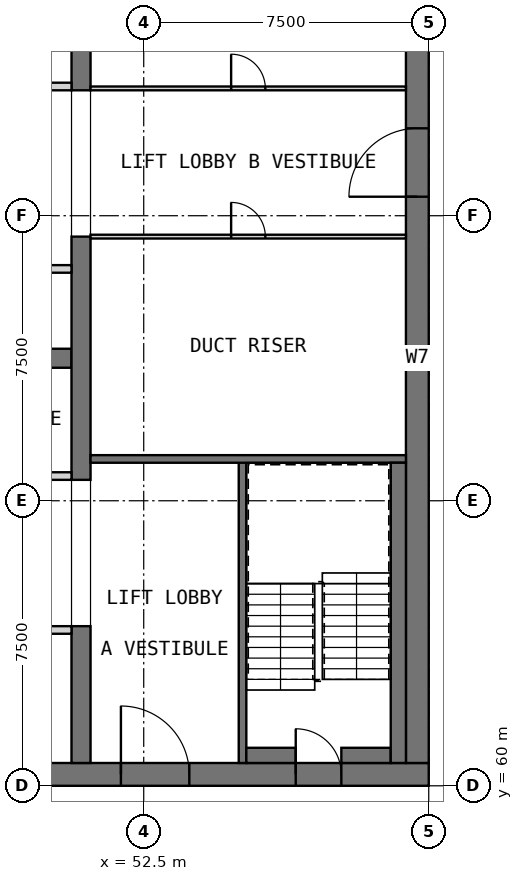
"""IFC4 building model, lengths in metres.
Left out: names, types, materials, properties, quantities, classifications, styles, units other than length and angle.
Written with IfcOpenShell. Run it as: python <this file> out.ifc"""

import sys

from ifc_helpers import new_model, si_unit, direction, frame, frame_2d, origin, place, context, subcontext, project, spatial, rectangle, extrude, element, fill, save


model = new_model("IFC4")
c1 = context("Model", 3, precision=1e-05, world=origin(), true_north=direction((0.0, 1.0)))
c2 = subcontext(c1, "Body", "Model", "MODEL_VIEW")
j1 = project(units=[si_unit("LENGTHUNIT", "METRE"), si_unit("PLANEANGLEUNIT", "RADIAN")], contexts=[c1])
p1 = place(None, origin())
s1 = spatial("IfcSite", under=j1, at=p1, CompositionType="ELEMENT")
p2 = place(p1, origin())
s2 = spatial("IfcBuilding", under=s1, at=p2, CompositionType="ELEMENT")
p3 = place(p2, frame((0.0, 0.0, 266.2)))
s3 = spatial("IfcBuildingStorey", under=s2, at=p3, CompositionType="ELEMENT", Elevation=266.2)
p4 = place(p3, frame((30.0, 60.3, 0.0), z_axis=(0.0, 0.0, 1.0), x_axis=(1.0, 0.0, 0.0)))
e1 = element("IfcWall", 1, at=p4, inside=s3, PredefinedType="SHEAR", context=c2, shape_type="SweptSolid", body=[
    extrude(rectangle(XDim=30.0, YDim=0.6, at=frame_2d((15.0, 0.0))), origin(), (0.0, 0.0, 1.0), 3.5),
])
p5 = place(p4, frame((21.9, 0.0, 0.0)))
e2 = element("IfcOpeningElement", 2, at=p5, cuts=e1, PredefinedType="OPENING", context=c2, shape_type="SweptSolid", body=[
    extrude(rectangle(XDim=1.8, YDim=2.1, at=frame_2d((0.9, 1.05))), frame((0.0, 0.31, 0.0), z_axis=(0.0, -1.0, 0.0), x_axis=(1.0, 0.0, 0.0)), (0.0, 0.0, 1.0), 0.62),
])
p6 = place(p4, frame((26.5, 0.0, 0.0)))
e3 = element("IfcOpeningElement", 3, at=p6, cuts=e1, PredefinedType="OPENING", context=c2, shape_type="SweptSolid", body=[
    extrude(rectangle(XDim=1.2, YDim=2.1, at=frame_2d((0.6, 1.05))), frame((0.0, 0.31, 0.0), z_axis=(0.0, -1.0, 0.0), x_axis=(1.0, 0.0, 0.0)), (0.0, 0.0, 1.0), 0.62),
])
p7 = place(p3, frame((59.7, 60.6, 0.0), z_axis=(0.0, 0.0, 1.0), x_axis=(0.0, 1.0, 0.0)))
e4 = element("IfcWall", 4, at=p7, inside=s3, PredefinedType="SHEAR", context=c2, shape_type="SweptSolid", body=[
    extrude(rectangle(XDim=21.3, YDim=0.6, at=frame_2d((10.65, 0.0))), origin(), (0.0, 0.0, 1.0), 3.5),
])
p8 = place(p7, frame((14.9, 0.0, 0.0)))
e5 = element("IfcOpeningElement", 5, at=p8, cuts=e4, PredefinedType="OPENING", context=c2, shape_type="SweptSolid", body=[
    extrude(rectangle(XDim=1.8, YDim=2.1, at=frame_2d((0.9, 1.05))), frame((0.0, 0.31, 0.0), z_axis=(0.0, -1.0, 0.0), x_axis=(1.0, 0.0, 0.0)), (0.0, 0.0, 1.0), 0.62),
])
p9 = place(p3, frame((35.0, 71.25, 0.0), z_axis=(0.0, 0.0, 1.0), x_axis=(1.0, 0.0, 0.0)))
e6 = element("IfcWall", 6, at=p9, inside=s3, PredefinedType="SHEAR", context=c2, shape_type="SweptSolid", body=[
    extrude(rectangle(XDim=15.6, YDim=0.5, at=frame_2d((7.8, 0.0))), origin(), (0.0, 0.0, 1.0), 3.5),
])
p10 = place(p3, frame((50.85, 60.6, 0.0), z_axis=(0.0, 0.0, 1.0), x_axis=(0.0, 1.0, 0.0)))
e7 = element("IfcWall", 7, at=p10, inside=s3, PredefinedType="SHEAR", context=c2, shape_type="SweptSolid", body=[
    extrude(rectangle(XDim=3.6, YDim=0.5, at=frame_2d((1.8, 0.0))), origin(), (0.0, 0.0, 1.0), 3.5),
])
p11 = place(p3, frame((50.85, 68.05, 0.0), z_axis=(0.0, 0.0, 1.0), x_axis=(0.0, 1.0, 0.0)))
e8 = element("IfcWall", 8, at=p11, inside=s3, PredefinedType="SHEAR", context=c2, shape_type="SweptSolid", body=[
    extrude(rectangle(XDim=6.4, YDim=0.5, at=frame_2d((3.2, 0.0))), origin(), (0.0, 0.0, 1.0), 3.5),
])
p12 = place(p3, frame((50.85, 78.3, 0.0), z_axis=(0.0, 0.0, 1.0), x_axis=(0.0, 1.0, 0.0)))
e9 = element("IfcWall", 9, at=p12, inside=s3, PredefinedType="SHEAR", context=c2, shape_type="SweptSolid", body=[
    extrude(rectangle(XDim=3.6, YDim=0.5, at=frame_2d((1.8, 0.0))), origin(), (0.0, 0.0, 1.0), 3.5),
])
p13 = place(p3, frame((35.0, 64.1, 0.0), z_axis=(0.0, 0.0, 1.0), x_axis=(1.0, 0.0, 0.0)))
e10 = element("IfcWall", 10, at=p13, inside=s3, PredefinedType="PARTITIONING", context=c2, shape_type="SweptSolid", body=[
    extrude(rectangle(XDim=15.6, YDim=0.2, at=frame_2d((7.8, 0.0))), origin(), (0.0, 0.0, 1.0), 3.25),
])
p14 = place(p13, frame((2.15, 0.0, 0.0)))
e11 = element("IfcOpeningElement", 11, at=p14, cuts=e10, PredefinedType="OPENING", context=c2, shape_type="SweptSolid", body=[
    extrude(rectangle(XDim=0.9, YDim=2.1, at=frame_2d((0.45, 1.05))), frame((0.0, 0.11, 0.0), z_axis=(0.0, -1.0, 0.0), x_axis=(1.0, 0.0, 0.0)), (0.0, 0.0, 1.0), 0.22),
])
p15 = place(p13, frame((9.95, 0.0, 0.0)))
e12 = element("IfcOpeningElement", 12, at=p15, cuts=e10, PredefinedType="OPENING", context=c2, shape_type="SweptSolid", body=[
    extrude(rectangle(XDim=0.9, YDim=2.1, at=frame_2d((0.45, 1.05))), frame((0.0, 0.11, 0.0), z_axis=(0.0, -1.0, 0.0), x_axis=(1.0, 0.0, 0.0)), (0.0, 0.0, 1.0), 0.22),
])
p16 = place(p3, frame((35.0, 68.15, 0.0), z_axis=(0.0, 0.0, 1.0), x_axis=(1.0, 0.0, 0.0)))
e13 = element("IfcWall", 13, at=p16, inside=s3, PredefinedType="PARTITIONING", context=c2, shape_type="SweptSolid", body=[
    extrude(rectangle(XDim=15.6, YDim=0.2, at=frame_2d((7.8, 0.0))), origin(), (0.0, 0.0, 1.0), 3.25),
])
p17 = place(p16, frame((1.5, 0.0, 0.0)))
e14 = element("IfcOpeningElement", 14, at=p17, cuts=e13, PredefinedType="OPENING", context=c2, shape_type="SweptSolid", body=[
    extrude(rectangle(XDim=0.9, YDim=2.1, at=frame_2d((0.45, 1.05))), frame((0.0, 0.11, 0.0), z_axis=(0.0, -1.0, 0.0), x_axis=(1.0, 0.0, 0.0)), (0.0, 0.0, 1.0), 0.22),
])
p18 = place(p16, frame((7.35, 0.0, 0.0)))
e15 = element("IfcOpeningElement", 15, at=p18, cuts=e13, PredefinedType="OPENING", context=c2, shape_type="SweptSolid", body=[
    extrude(rectangle(XDim=0.9, YDim=2.1, at=frame_2d((0.45, 1.05))), frame((0.0, 0.11, 0.0), z_axis=(0.0, -1.0, 0.0), x_axis=(1.0, 0.0, 0.0)), (0.0, 0.0, 1.0), 0.22),
])
p19 = place(p16, frame((13.2, 0.0, 0.0)))
e16 = element("IfcOpeningElement", 16, at=p19, cuts=e13, PredefinedType="OPENING", context=c2, shape_type="SweptSolid", body=[
    extrude(rectangle(XDim=0.9, YDim=2.1, at=frame_2d((0.45, 1.05))), frame((0.0, 0.11, 0.0), z_axis=(0.0, -1.0, 0.0), x_axis=(1.0, 0.0, 0.0)), (0.0, 0.0, 1.0), 0.22),
])
p20 = place(p3, frame((35.0, 73.6, 0.0), z_axis=(0.0, 0.0, 1.0), x_axis=(1.0, 0.0, 0.0)))
e17 = element("IfcWall", 17, at=p20, inside=s3, PredefinedType="SOLIDWALL", context=c2, shape_type="SweptSolid", body=[
    extrude(rectangle(XDim=15.6, YDim=0.2, at=frame_2d((7.8, 0.0))), origin(), (0.0, 0.0, 1.0), 3.5),
])
p21 = place(p20, frame((0.75, 0.0, 0.0)))
e18 = element("IfcOpeningElement", 18, at=p21, cuts=e17, PredefinedType="OPENING", context=c2, shape_type="SweptSolid", body=[
    extrude(rectangle(XDim=1.1, YDim=2.1, at=frame_2d((0.55, 1.05))), frame((0.0, 0.11, 0.0), z_axis=(0.0, -1.0, 0.0), x_axis=(1.0, 0.0, 0.0)), (0.0, 0.0, 1.0), 0.22),
])
p22 = place(p20, frame((3.35, 0.0, 0.0)))
e19 = element("IfcOpeningElement", 19, at=p22, cuts=e17, PredefinedType="OPENING", context=c2, shape_type="SweptSolid", body=[
    extrude(rectangle(XDim=1.1, YDim=2.1, at=frame_2d((0.55, 1.05))), frame((0.0, 0.11, 0.0), z_axis=(0.0, -1.0, 0.0), x_axis=(1.0, 0.0, 0.0)), (0.0, 0.0, 1.0), 0.22),
])
p23 = place(p20, frame((5.95, 0.0, 0.0)))
e20 = element("IfcOpeningElement", 20, at=p23, cuts=e17, PredefinedType="OPENING", context=c2, shape_type="SweptSolid", body=[
    extrude(rectangle(XDim=1.1, YDim=2.1, at=frame_2d((0.55, 1.05))), frame((0.0, 0.11, 0.0), z_axis=(0.0, -1.0, 0.0), x_axis=(1.0, 0.0, 0.0)), (0.0, 0.0, 1.0), 0.22),
])
p24 = place(p20, frame((8.55, 0.0, 0.0)))
e21 = element("IfcOpeningElement", 21, at=p24, cuts=e17, PredefinedType="OPENING", context=c2, shape_type="SweptSolid", body=[
    extrude(rectangle(XDim=1.1, YDim=2.1, at=frame_2d((0.55, 1.05))), frame((0.0, 0.11, 0.0), z_axis=(0.0, -1.0, 0.0), x_axis=(1.0, 0.0, 0.0)), (0.0, 0.0, 1.0), 0.22),
])
p25 = place(p20, frame((11.15, 0.0, 0.0)))
e22 = element("IfcOpeningElement", 22, at=p25, cuts=e17, PredefinedType="OPENING", context=c2, shape_type="SweptSolid", body=[
    extrude(rectangle(XDim=1.1, YDim=2.1, at=frame_2d((0.55, 1.05))), frame((0.0, 0.11, 0.0), z_axis=(0.0, -1.0, 0.0), x_axis=(1.0, 0.0, 0.0)), (0.0, 0.0, 1.0), 0.22),
])
p26 = place(p20, frame((13.75, 0.0, 0.0)))
e23 = element("IfcOpeningElement", 23, at=p26, cuts=e17, PredefinedType="OPENING", context=c2, shape_type="SweptSolid", body=[
    extrude(rectangle(XDim=1.1, YDim=2.1, at=frame_2d((0.55, 1.05))), frame((0.0, 0.11, 0.0), z_axis=(0.0, -1.0, 0.0), x_axis=(1.0, 0.0, 0.0)), (0.0, 0.0, 1.0), 0.22),
])
p27 = place(p3, frame((35.0, 78.4, 0.0), z_axis=(0.0, 0.0, 1.0), x_axis=(1.0, 0.0, 0.0)))
e24 = element("IfcWall", 24, at=p27, inside=s3, PredefinedType="SOLIDWALL", context=c2, shape_type="SweptSolid", body=[
    extrude(rectangle(XDim=15.6, YDim=0.2, at=frame_2d((7.8, 0.0))), origin(), (0.0, 0.0, 1.0), 3.5),
])
p28 = place(p27, frame((0.75, 0.0, 0.0)))
e25 = element("IfcOpeningElement", 25, at=p28, cuts=e24, PredefinedType="OPENING", context=c2, shape_type="SweptSolid", body=[
    extrude(rectangle(XDim=1.1, YDim=2.1, at=frame_2d((0.55, 1.05))), frame((0.0, 0.11, 0.0), z_axis=(0.0, -1.0, 0.0), x_axis=(1.0, 0.0, 0.0)), (0.0, 0.0, 1.0), 0.22),
])
p29 = place(p27, frame((3.35, 0.0, 0.0)))
e26 = element("IfcOpeningElement", 26, at=p29, cuts=e24, PredefinedType="OPENING", context=c2, shape_type="SweptSolid", body=[
    extrude(rectangle(XDim=1.1, YDim=2.1, at=frame_2d((0.55, 1.05))), frame((0.0, 0.11, 0.0), z_axis=(0.0, -1.0, 0.0), x_axis=(1.0, 0.0, 0.0)), (0.0, 0.0, 1.0), 0.22),
])
p30 = place(p27, frame((11.15, 0.0, 0.0)))
e27 = element("IfcOpeningElement", 27, at=p30, cuts=e24, PredefinedType="OPENING", context=c2, shape_type="SweptSolid", body=[
    extrude(rectangle(XDim=1.1, YDim=2.1, at=frame_2d((0.55, 1.05))), frame((0.0, 0.11, 0.0), z_axis=(0.0, -1.0, 0.0), x_axis=(1.0, 0.0, 0.0)), (0.0, 0.0, 1.0), 0.22),
])
p31 = place(p27, frame((13.75, 0.0, 0.0)))
e28 = element("IfcOpeningElement", 28, at=p31, cuts=e24, PredefinedType="OPENING", context=c2, shape_type="SweptSolid", body=[
    extrude(rectangle(XDim=1.1, YDim=2.1, at=frame_2d((0.55, 1.05))), frame((0.0, 0.11, 0.0), z_axis=(0.0, -1.0, 0.0), x_axis=(1.0, 0.0, 0.0)), (0.0, 0.0, 1.0), 0.22),
])
p32 = place(p3, frame((55.1, 60.6, 0.0), z_axis=(0.0, 0.0, 1.0), x_axis=(0.0, 1.0, 0.0)))
e29 = element("IfcWall", 29, at=p32, inside=s3, PredefinedType="SOLIDWALL", context=c2, shape_type="SweptSolid", body=[
    extrude(rectangle(XDim=8.0, YDim=0.2, at=frame_2d((4.0, 0.0))), origin(), (0.0, 0.0, 1.0), 3.25),
])
p33 = place(p3, frame((51.1, 68.6, 0.0), z_axis=(0.0, 0.0, 1.0), x_axis=(1.0, 0.0, 0.0)))
e30 = element("IfcWall", 30, at=p33, inside=s3, PredefinedType="SOLIDWALL", context=c2, shape_type="SweptSolid", body=[
    extrude(rectangle(XDim=8.3, YDim=0.2, at=frame_2d((4.15, 0.0))), origin(), (0.0, 0.0, 1.0), 3.25),
])
for number, where, z_axis, x_axis in (
    (31, (55.2, 60.8, 0.0), (0.0, 0.0, 1.0), (1.0, 0.0, 0.0)),
    (32, (57.7, 60.8, 0.0), (0.0, 0.0, 1.0), (1.0, 0.0, 0.0)),
):
    element("IfcWall", number, at=place(p3, frame(where, z_axis=z_axis, x_axis=x_axis)), inside=s3, PredefinedType="SOLIDWALL", context=c2, shape_type="SweptSolid", body=[
        extrude(rectangle(XDim=1.3, YDim=0.4, at=frame_2d((0.65, 0.0))), origin(), (0.0, 0.0, 1.0), 3.25),
    ])
p34 = place(p3, frame((59.2, 60.6, 0.0), z_axis=(0.0, 0.0, 1.0), x_axis=(0.0, 1.0, 0.0)))
e33 = element("IfcWall", 33, at=p34, inside=s3, PredefinedType="SOLIDWALL", context=c2, shape_type="SweptSolid", body=[
    extrude(rectangle(XDim=7.9, YDim=0.4, at=frame_2d((3.95, 0.0))), origin(), (0.0, 0.0, 1.0), 3.25),
])
p35 = place(p3, frame((51.1, 74.45, 0.0), z_axis=(0.0, 0.0, 1.0), x_axis=(1.0, 0.0, 0.0)))
e34 = element("IfcWall", 34, at=p35, inside=s3, PredefinedType="PARTITIONING", context=c2, shape_type="SweptSolid", body=[
    extrude(rectangle(XDim=8.3, YDim=0.1, at=frame_2d((4.15, 0.0))), origin(), (0.0, 0.0, 1.0), 3.25),
])
p36 = place(p35, frame((3.7, 0.0, 0.0)))
e35 = element("IfcOpeningElement", 35, at=p36, cuts=e34, PredefinedType="OPENING", context=c2, shape_type="SweptSolid", body=[
    extrude(rectangle(XDim=0.9, YDim=2.1, at=frame_2d((0.45, 1.05))), frame((0.0, 0.06, 0.0), z_axis=(0.0, -1.0, 0.0), x_axis=(1.0, 0.0, 0.0)), (0.0, 0.0, 1.0), 0.12),
])
p37 = place(p3, frame((51.1, 78.35, 0.0), z_axis=(0.0, 0.0, 1.0), x_axis=(1.0, 0.0, 0.0)))
e36 = element("IfcWall", 36, at=p37, inside=s3, PredefinedType="PARTITIONING", context=c2, shape_type="SweptSolid", body=[
    extrude(rectangle(XDim=8.3, YDim=0.1, at=frame_2d((4.15, 0.0))), origin(), (0.0, 0.0, 1.0), 3.25),
])
p38 = place(p37, frame((3.7, 0.0, 0.0)))
e37 = element("IfcOpeningElement", 37, at=p38, cuts=e36, PredefinedType="OPENING", context=c2, shape_type="SweptSolid", body=[
    extrude(rectangle(XDim=0.9, YDim=2.1, at=frame_2d((0.45, 1.05))), frame((0.0, 0.06, 0.0), z_axis=(0.0, -1.0, 0.0), x_axis=(1.0, 0.0, 0.0)), (0.0, 0.0, 1.0), 0.12),
])
p39 = place(p5, origin())
e38 = element("IfcDoor", 38, at=p39, inside=s3, OperationType="DOUBLE_DOOR_SINGLE_SWING", PredefinedType="DOOR", context=c2, shape_type="SweptSolid", body=[
    extrude(rectangle(XDim=1.8, YDim=2.1, at=frame_2d((0.9, 1.05))), frame((0.0, 0.025, 0.0), z_axis=(0.0, -1.0, 0.0), x_axis=(1.0, 0.0, 0.0)), (0.0, 0.0, 1.0), 0.05),
])
fill(e2, e38)
p40 = place(p8, origin())
e39 = element("IfcDoor", 39, at=p40, inside=s3, OperationType="DOUBLE_DOOR_SINGLE_SWING", PredefinedType="DOOR", context=c2, shape_type="SweptSolid", body=[
    extrude(rectangle(XDim=1.8, YDim=2.1, at=frame_2d((0.9, 1.05))), frame((0.0, 0.025, 0.0), z_axis=(0.0, -1.0, 0.0), x_axis=(1.0, 0.0, 0.0)), (0.0, 0.0, 1.0), 0.05),
])
fill(e5, e39)
p41 = place(p6, origin())
e40 = element("IfcDoor", 40, at=p41, inside=s3, OperationType="SINGLE_SWING_LEFT", PredefinedType="DOOR", context=c2, shape_type="SweptSolid", body=[
    extrude(rectangle(XDim=1.2, YDim=2.1, at=frame_2d((0.6, 1.05))), frame((0.0, 0.025, 0.0), z_axis=(0.0, -1.0, 0.0), x_axis=(1.0, 0.0, 0.0)), (0.0, 0.0, 1.0), 0.05),
])
fill(e3, e40)
p42 = place(p36, origin())
e41 = element("IfcDoor", 41, at=p42, inside=s3, OperationType="SINGLE_SWING_RIGHT", PredefinedType="DOOR", context=c2, shape_type="SweptSolid", body=[
    extrude(rectangle(XDim=0.9, YDim=2.1, at=frame_2d((0.45, 1.05))), frame((0.0, 0.025, 0.0), z_axis=(0.0, -1.0, 0.0), x_axis=(1.0, 0.0, 0.0)), (0.0, 0.0, 1.0), 0.05),
])
fill(e35, e41)
p43 = place(p38, origin())
e42 = element("IfcDoor", 42, at=p43, inside=s3, OperationType="SINGLE_SWING_RIGHT", PredefinedType="DOOR", context=c2, shape_type="SweptSolid", body=[
    extrude(rectangle(XDim=0.9, YDim=2.1, at=frame_2d((0.45, 1.05))), frame((0.0, 0.025, 0.0), z_axis=(0.0, -1.0, 0.0), x_axis=(1.0, 0.0, 0.0)), (0.0, 0.0, 1.0), 0.05),
])
fill(e37, e42)
save(model, sys.argv[1])
